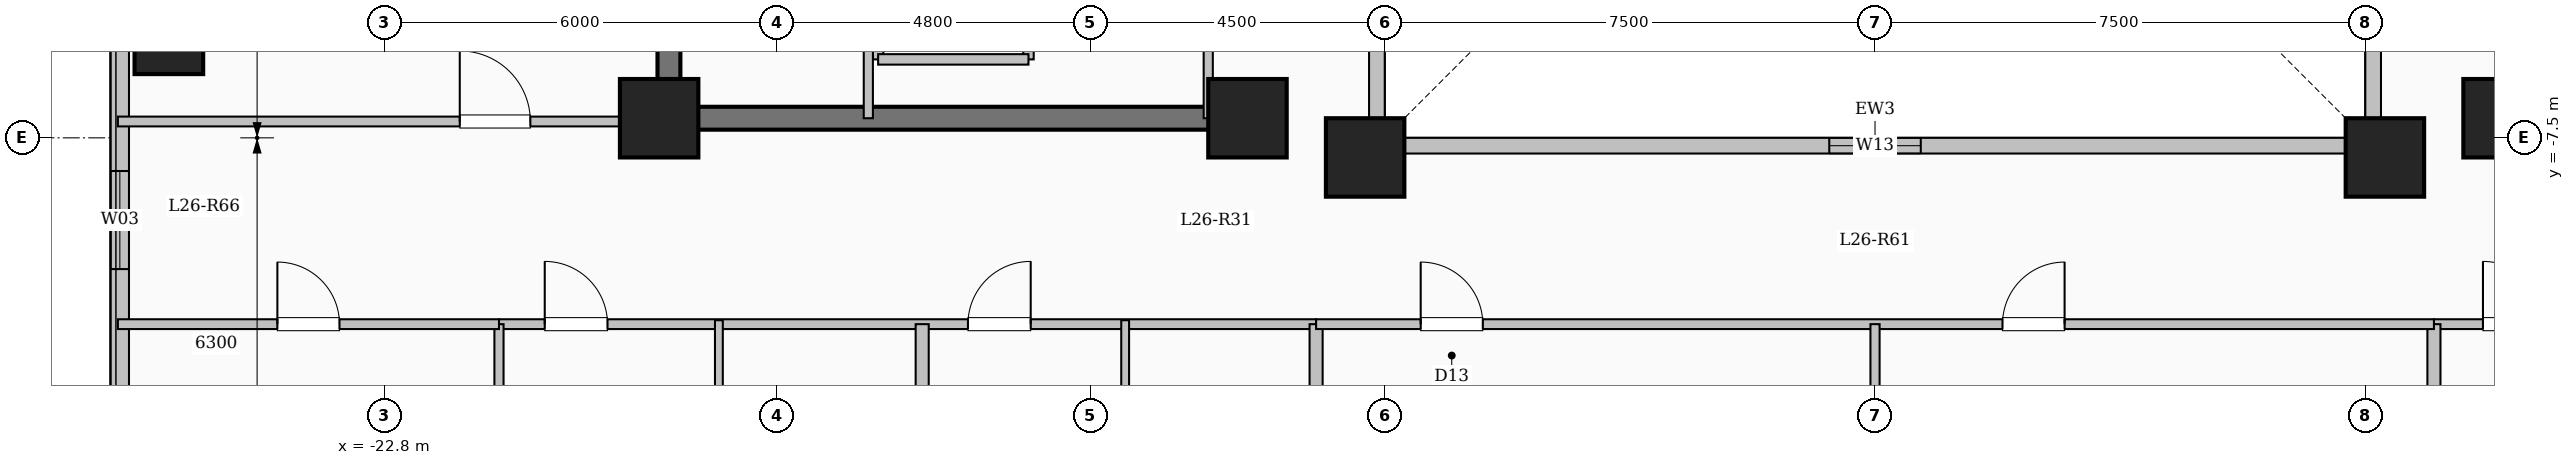
"""IFC4 building model, lengths in metres.
Left out: names, types, materials, properties, quantities, classifications, styles, units other than length and angle.
Written with IfcOpenShell. Run it as: python <this file> out.ifc"""

import sys

from ifc_helpers import new_model, si_unit, direction, frame, frame_2d, origin, origin_2d, place, context, subcontext, project, spatial, rectangle, extrude, element, fill, save


model = new_model("IFC4")
c1 = context("Model", 3, precision=1e-05, world=origin(), true_north=direction((0.0, 1.0)))
c2 = subcontext(c1, "Body", "Model", "MODEL_VIEW")
j1 = project(units=[si_unit("LENGTHUNIT", "METRE"), si_unit("PLANEANGLEUNIT", "RADIAN")], contexts=[c1])
p1 = place(None, origin())
s1 = spatial("IfcSite", under=j1, at=p1, CompositionType="ELEMENT")
p2 = place(p1, origin())
s2 = spatial("IfcBuilding", under=s1, at=p2, CompositionType="ELEMENT")
p3 = place(p2, frame((0.0, 0.0, 98.4)))
s3 = spatial("IfcBuildingStorey", under=s2, at=p3, CompositionType="ELEMENT", Elevation=98.4)
for number, where, z_axis, x_axis in (
    (1, (-7.8, -7.8, 0.0), (0.0, 0.0, 1.0), (1.0, 0.0, 0.0)),
    (2, (7.8, -7.8, 0.0), (0.0, 0.0, 1.0), (1.0, 0.0, 0.0)),
    (3, (-9.6, -7.2, 0.0), (0.0, 0.0, 1.0), (1.0, 0.0, 0.0)),
    (4, (9.6, -7.2, 0.0), (0.0, 0.0, 1.0), (1.0, 0.0, 0.0)),
    (5, (-18.6, -7.2, 0.0), (0.0, 0.0, 1.0), (1.0, 0.0, 0.0)),
):
    element("IfcColumn", number, at=place(p3, frame(where, z_axis=z_axis, x_axis=x_axis)), inside=s3, PredefinedType="COLUMN", context=c2, shape_type="SweptSolid", body=[
        extrude(rectangle(XDim=1.2, YDim=1.2, at=origin_2d()), origin(), (0.0, 0.0, 1.0), 3.35),
    ])
p4 = place(p3, frame((-26.1, -6.0, 0.0), z_axis=(0.0, 0.0, 1.0), x_axis=(1.0, 0.0, 0.0)))
e6 = element("IfcColumn", 6, at=p4, inside=s3, PredefinedType="COLUMN", context=c2, shape_type="SweptSolid", body=[
    extrude(rectangle(XDim=1.05, YDim=1.05, at=origin_2d()), origin(), (0.0, 0.0, 1.0), 3.35),
])
p5 = place(p3, frame((-7.62, -7.62, 0.0), z_axis=(0.0, 0.0, 1.0), x_axis=(1.0, 0.0, 0.0)))
e7 = element("IfcWall", 7, at=p5, inside=s3, PredefinedType="SOLIDWALL", context=c2, shape_type="SweptSolid", body=[
    extrude(rectangle(XDim=15.24, YDim=0.24, at=frame_2d((7.62, 0.0))), origin(), (0.0, 0.0, 1.0), 3.1),
])
p6 = place(p5, frame((6.92, 0.0, 0.95)))
e8 = element("IfcOpeningElement", 8, at=p6, cuts=e7, PredefinedType="OPENING", context=c2, shape_type="SweptSolid", body=[
    extrude(rectangle(XDim=1.4, YDim=1.5, at=frame_2d((0.7, 0.75))), frame((0.0, 0.13, 0.0), z_axis=(0.0, -1.0, 0.0), x_axis=(1.0, 0.0, 0.0)), (0.0, 0.0, 1.0), 0.26),
])
p7 = place(p3, frame((7.62, -7.62, 0.0), z_axis=(0.0, 0.0, 1.0), x_axis=(0.0, 1.0, 0.0)))
e9 = element("IfcWall", 9, at=p7, inside=s3, PredefinedType="SOLIDWALL", context=c2, shape_type="SweptSolid", body=[
    extrude(rectangle(XDim=15.24, YDim=0.24, at=frame_2d((7.62, 0.0))), origin(), (0.0, 0.0, 1.0), 3.1),
])
p8 = place(p7, frame((6.92, 0.0, 0.95)))
e10 = element("IfcOpeningElement", 10, at=p8, cuts=e9, PredefinedType="OPENING", context=c2, shape_type="SweptSolid", body=[
    extrude(rectangle(XDim=1.4, YDim=1.5, at=frame_2d((0.7, 0.75))), frame((0.0, 0.13, 0.0), z_axis=(0.0, -1.0, 0.0), x_axis=(1.0, 0.0, 0.0)), (0.0, 0.0, 1.0), 0.26),
])
p9 = place(p3, frame((-7.62, 7.62, 0.0), z_axis=(0.0, 0.0, 1.0), x_axis=(0.0, -1.0, 0.0)))
e11 = element("IfcWall", 11, at=p9, inside=s3, PredefinedType="SOLIDWALL", context=c2, shape_type="SweptSolid", body=[
    extrude(rectangle(XDim=15.24, YDim=0.24, at=frame_2d((7.62, 0.0))), origin(), (0.0, 0.0, 1.0), 3.1),
])
p10 = place(p9, frame((6.92, 0.0, 0.95)))
e12 = element("IfcOpeningElement", 12, at=p10, cuts=e11, PredefinedType="OPENING", context=c2, shape_type="SweptSolid", body=[
    extrude(rectangle(XDim=1.4, YDim=1.5, at=frame_2d((0.7, 0.75))), frame((0.0, 0.13, 0.0), z_axis=(0.0, -1.0, 0.0), x_axis=(1.0, 0.0, 0.0)), (0.0, 0.0, 1.0), 0.26),
])
p11 = place(p3, frame((-26.85, -17.85, 0.0), z_axis=(0.0, 0.0, 1.0), x_axis=(0.0, 1.0, 0.0)))
e13 = element("IfcWall", 13, at=p11, inside=s3, PredefinedType="SOLIDWALL", context=c2, shape_type="SweptSolid", body=[
    extrude(rectangle(XDim=35.7, YDim=0.28, at=frame_2d((17.85, 0.0))), origin(), (0.0, 0.0, 1.0), 3.1),
])
p12 = place(p11, frame((2.55, 0.0, 0.9)))
e14 = element("IfcOpeningElement", 14, at=p12, cuts=e13, PredefinedType="OPENING", context=c2, shape_type="SweptSolid", body=[
    extrude(rectangle(XDim=2.4, YDim=1.8, at=frame_2d((1.2, 0.9))), frame((0.0, 0.15, 0.0), z_axis=(0.0, -1.0, 0.0), x_axis=(1.0, 0.0, 0.0)), (0.0, 0.0, 1.0), 0.3),
])
p13 = place(p11, frame((8.343, 0.0, 0.9)))
e15 = element("IfcOpeningElement", 15, at=p13, cuts=e13, PredefinedType="OPENING", context=c2, shape_type="SweptSolid", body=[
    extrude(rectangle(XDim=1.5, YDim=1.65, at=frame_2d((0.75, 0.825))), frame((0.0, 0.15, 0.0), z_axis=(0.0, -1.0, 0.0), x_axis=(1.0, 0.0, 0.0)), (0.0, 0.0, 1.0), 0.3),
])
p14 = place(p11, frame((18.6, 0.0, 0.9)))
e16 = element("IfcOpeningElement", 16, at=p14, cuts=e13, PredefinedType="OPENING", context=c2, shape_type="SweptSolid", body=[
    extrude(rectangle(XDim=2.0, YDim=1.7, at=frame_2d((1.0, 0.85))), frame((0.0, 0.15, 0.0), z_axis=(0.0, -1.0, 0.0), x_axis=(1.0, 0.0, 0.0)), (0.0, 0.0, 1.0), 0.3),
])
p15 = place(p11, frame((28.975, 0.0, 0.95)))
e17 = element("IfcOpeningElement", 17, at=p15, cuts=e13, PredefinedType="OPENING", context=c2, shape_type="SweptSolid", body=[
    extrude(rectangle(XDim=1.0, YDim=1.5, at=frame_2d((0.5, 0.75))), frame((0.0, 0.15, 0.0), z_axis=(0.0, -1.0, 0.0), x_axis=(1.0, 0.0, 0.0)), (0.0, 0.0, 1.0), 0.3),
])
p16 = place(p11, frame((32.025, 0.0, 0.9)))
e18 = element("IfcOpeningElement", 18, at=p16, cuts=e13, PredefinedType="OPENING", context=c2, shape_type="SweptSolid", body=[
    extrude(rectangle(XDim=2.0, YDim=1.7, at=frame_2d((1.0, 0.85))), frame((0.0, 0.15, 0.0), z_axis=(0.0, -1.0, 0.0), x_axis=(1.0, 0.0, 0.0)), (0.0, 0.0, 1.0), 0.3),
])
for number, where, z_axis, x_axis in (
    (19, (-15.25, -6.3, 0.0), (0.0, 0.0, 1.0), (0.0, 1.0, 0.0)),
    (20, (-12.95, -6.3, 0.0), (0.0, 0.0, 1.0), (0.0, 1.0, 0.0)),
):
    element("IfcWall", number, at=place(p3, frame(where, z_axis=z_axis, x_axis=x_axis)), inside=s3, PredefinedType="SOLIDWALL", context=c2, shape_type="SweptSolid", body=[
        extrude(rectangle(XDim=2.6, YDim=0.16, at=frame_2d((1.3, 0.0))), origin(), (0.0, 0.0, 1.0), 3.1),
    ])
p17 = place(p3, frame((-15.25, -6.3, 0.0), z_axis=(0.0, 0.0, 1.0), x_axis=(1.0, 0.0, 0.0)))
e21 = element("IfcWall", 21, at=p17, inside=s3, PredefinedType="SOLIDWALL", context=c2, shape_type="SweptSolid", body=[
    extrude(rectangle(XDim=2.3, YDim=0.16, at=frame_2d((1.15, 0.0))), origin(), (0.0, 0.0, 1.0), 3.1),
])
p18 = place(p3, frame((-18.45, -7.375, 0.0), z_axis=(0.0, 0.0, 1.0), x_axis=(0.0, 1.0, 0.0)))
e22 = element("IfcWall", 22, at=p18, inside=s3, PredefinedType="SHEAR", context=c2, shape_type="SweptSolid", body=[
    extrude(rectangle(XDim=14.05, YDim=0.35, at=frame_2d((7.025, 0.0))), origin(), (0.0, 0.0, 1.0), 3.35),
])
p19 = place(p3, frame((-18.625, -7.2, 0.0), z_axis=(0.0, 0.0, 1.0), x_axis=(1.0, 0.0, 0.0)))
e23 = element("IfcWall", 23, at=p19, inside=s3, PredefinedType="SHEAR", context=c2, shape_type="SweptSolid", body=[
    extrude(rectangle(XDim=8.55, YDim=0.35, at=frame_2d((4.275, 0.0))), origin(), (0.0, 0.0, 1.0), 3.35),
])
p20 = place(p3, frame((-15.4, -7.2, 0.0), z_axis=(0.0, 0.0, 1.0), x_axis=(0.0, 1.0, 0.0)))
e24 = element("IfcWall", 24, at=p20, inside=s3, PredefinedType="PARTITIONING", context=c2, shape_type="SweptSolid", body=[
    extrude(rectangle(XDim=10.45, YDim=0.14, at=frame_2d((5.225, 0.0))), origin(), (0.0, 0.0, 1.0), 3.1),
])
p21 = place(p20, frame((9.25, 0.0, 0.0)))
e25 = element("IfcOpeningElement", 25, at=p21, cuts=e24, PredefinedType="OPENING", context=c2, shape_type="SweptSolid", body=[
    extrude(rectangle(XDim=0.9, YDim=2.08, at=frame_2d((0.45, 1.04))), frame((0.0, 0.08, 0.0), z_axis=(0.0, -1.0, 0.0), x_axis=(1.0, 0.0, 0.0)), (0.0, 0.0, 1.0), 0.16),
])
p22 = place(p3, frame((-10.2, -7.2, 0.0), z_axis=(0.0, 0.0, 1.0), x_axis=(0.0, 1.0, 0.0)))
e26 = element("IfcWall", 26, at=p22, inside=s3, PredefinedType="PARTITIONING", context=c2, shape_type="SweptSolid", body=[
    extrude(rectangle(XDim=9.12, YDim=0.14, at=frame_2d((4.56, 0.0))), origin(), (0.0, 0.0, 1.0), 3.1),
])
p23 = place(p22, frame((1.9, 0.0, 0.0)))
e27 = element("IfcOpeningElement", 27, at=p23, cuts=e26, PredefinedType="OPENING", context=c2, shape_type="SweptSolid", body=[
    extrude(rectangle(XDim=0.95, YDim=2.12, at=frame_2d((0.475, 1.06))), frame((0.0, 0.08, 0.0), z_axis=(0.0, -1.0, 0.0), x_axis=(1.0, 0.0, 0.0)), (0.0, 0.0, 1.0), 0.16),
])
p24 = place(p22, frame((6.6, 0.0, 0.0)))
e28 = element("IfcOpeningElement", 28, at=p24, cuts=e26, PredefinedType="OPENING", context=c2, shape_type="SweptSolid", body=[
    extrude(rectangle(XDim=0.95, YDim=2.12, at=frame_2d((0.475, 1.06))), frame((0.0, 0.08, 0.0), z_axis=(0.0, -1.0, 0.0), x_axis=(1.0, 0.0, 0.0)), (0.0, 0.0, 1.0), 0.16),
])
p25 = place(p3, frame((-21.05, -10.35, 0.0), z_axis=(0.0, 0.0, 1.0), x_axis=(1.0, 0.0, 0.0)))
e29 = element("IfcWall", 29, at=p25, inside=s3, PredefinedType="PARTITIONING", context=c2, shape_type="SweptSolid", body=[
    extrude(rectangle(XDim=12.5, YDim=0.15, at=frame_2d((6.25, 0.0))), origin(), (0.0, 0.0, 1.0), 3.1),
])
p26 = place(p25, frame((0.7, 0.0, 0.0)))
e30 = element("IfcOpeningElement", 30, at=p26, cuts=e29, PredefinedType="OPENING", context=c2, shape_type="SweptSolid", body=[
    extrude(rectangle(XDim=0.96, YDim=2.15, at=frame_2d((0.48, 1.075))), frame((0.0, 0.085, 0.0), z_axis=(0.0, -1.0, 0.0), x_axis=(1.0, 0.0, 0.0)), (0.0, 0.0, 1.0), 0.17),
])
p27 = place(p25, frame((7.174, 0.0, 0.0)))
e31 = element("IfcOpeningElement", 31, at=p27, cuts=e29, PredefinedType="OPENING", context=c2, shape_type="SweptSolid", body=[
    extrude(rectangle(XDim=0.96, YDim=2.15, at=frame_2d((0.48, 1.075))), frame((0.0, 0.085, 0.0), z_axis=(0.0, -1.0, 0.0), x_axis=(1.0, 0.0, 0.0)), (0.0, 0.0, 1.0), 0.17),
])
p28 = place(p3, frame((8.55, -10.35, 0.0), z_axis=(0.0, 0.0, 1.0), x_axis=(1.0, 0.0, 0.0)))
e32 = element("IfcWall", 32, at=p28, inside=s3, PredefinedType="PARTITIONING", context=c2, shape_type="SweptSolid", body=[
    extrude(rectangle(XDim=12.5, YDim=0.15, at=frame_2d((6.25, 0.0))), origin(), (0.0, 0.0, 1.0), 3.1),
])
p29 = place(p28, frame((0.75, 0.0, 0.0)))
e33 = element("IfcOpeningElement", 33, at=p29, cuts=e32, PredefinedType="OPENING", context=c2, shape_type="SweptSolid", body=[
    extrude(rectangle(XDim=0.96, YDim=2.15, at=frame_2d((0.48, 1.075))), frame((0.0, 0.085, 0.0), z_axis=(0.0, -1.0, 0.0), x_axis=(1.0, 0.0, 0.0)), (0.0, 0.0, 1.0), 0.17),
])
p30 = place(p28, frame((6.975, 0.0, 0.0)))
e34 = element("IfcOpeningElement", 34, at=p30, cuts=e32, PredefinedType="OPENING", context=c2, shape_type="SweptSolid", body=[
    extrude(rectangle(XDim=0.96, YDim=2.15, at=frame_2d((0.48, 1.075))), frame((0.0, 0.085, 0.0), z_axis=(0.0, -1.0, 0.0), x_axis=(1.0, 0.0, 0.0)), (0.0, 0.0, 1.0), 0.17),
])
p31 = place(p3, frame((-14.576, -22.1, 0.0), z_axis=(0.0, 0.0, 1.0), x_axis=(0.0, 1.0, 0.0)))
e35 = element("IfcWall", 35, at=p31, inside=s3, PredefinedType="SOLIDWALL", context=c2, shape_type="SweptSolid", body=[
    extrude(rectangle(XDim=11.75, YDim=0.2, at=frame_2d((5.875, 0.0))), origin(), (0.0, 0.0, 1.0), 3.1),
])
p32 = place(p3, frame((-17.686, -13.51, 0.0), z_axis=(0.0, 0.0, 1.0), x_axis=(0.0, 1.0, 0.0)))
e36 = element("IfcWall", 36, at=p32, inside=s3, PredefinedType="PARTITIONING", context=c2, shape_type="SweptSolid", body=[
    extrude(rectangle(XDim=3.22, YDim=0.12, at=frame_2d((1.61, 0.0))), origin(), (0.0, 0.0, 1.0), 3.1),
])
p33 = place(p32, frame((1.14, 0.0, 0.0)))
e37 = element("IfcOpeningElement", 37, at=p33, cuts=e36, PredefinedType="OPENING", context=c2, shape_type="SweptSolid", body=[
    extrude(rectangle(XDim=0.88, YDim=2.1, at=frame_2d((0.44, 1.05))), frame((0.0, 0.07, 0.0), z_axis=(0.0, -1.0, 0.0), x_axis=(1.0, 0.0, 0.0)), (0.0, 0.0, 1.0), 0.14),
])
p34 = place(p3, frame((-11.471, -13.51, 0.0), z_axis=(0.0, 0.0, 1.0), x_axis=(0.0, 1.0, 0.0)))
e38 = element("IfcWall", 38, at=p34, inside=s3, PredefinedType="PARTITIONING", context=c2, shape_type="SweptSolid", body=[
    extrude(rectangle(XDim=3.22, YDim=0.12, at=frame_2d((1.61, 0.0))), origin(), (0.0, 0.0, 1.0), 3.1),
])
p35 = place(p34, frame((1.14, 0.0, 0.0)))
e39 = element("IfcOpeningElement", 39, at=p35, cuts=e38, PredefinedType="OPENING", context=c2, shape_type="SweptSolid", body=[
    extrude(rectangle(XDim=0.88, YDim=2.1, at=frame_2d((0.44, 1.05))), frame((0.0, 0.07, 0.0), z_axis=(0.0, -1.0, 0.0), x_axis=(1.0, 0.0, 0.0)), (0.0, 0.0, 1.0), 0.14),
])
for number, where, z_axis, x_axis in (
    (40, (-8.55, -22.704, 0.0), (0.0, 0.0, 1.0), (0.0, 1.0, 0.0)),
    (41, (8.55, -22.704, 0.0), (0.0, 0.0, 1.0), (0.0, 1.0, 0.0)),
):
    element("IfcWall", number, at=place(p3, frame(where, z_axis=z_axis, x_axis=x_axis)), inside=s3, PredefinedType="SOLIDWALL", context=c2, shape_type="SweptSolid", body=[
        extrude(rectangle(XDim=12.354, YDim=0.2, at=frame_2d((6.177, 0.0))), origin(), (0.0, 0.0, 1.0), 3.1),
    ])
p36 = place(p3, frame((-8.55, -10.35, 0.0), z_axis=(0.0, 0.0, 1.0), x_axis=(1.0, 0.0, 0.0)))
e42 = element("IfcWall", 42, at=p36, inside=s3, PredefinedType="PARTITIONING", context=c2, shape_type="SweptSolid", body=[
    extrude(rectangle(XDim=17.1, YDim=0.15, at=frame_2d((8.55, 0.0))), origin(), (0.0, 0.0, 1.0), 3.1),
])
p37 = place(p36, frame((1.6, 0.0, 0.0)))
e43 = element("IfcOpeningElement", 43, at=p37, cuts=e42, PredefinedType="OPENING", context=c2, shape_type="SweptSolid", body=[
    extrude(rectangle(XDim=0.95, YDim=2.15, at=frame_2d((0.475, 1.075))), frame((0.0, 0.085, 0.0), z_axis=(0.0, -1.0, 0.0), x_axis=(1.0, 0.0, 0.0)), (0.0, 0.0, 1.0), 0.17),
])
p38 = place(p36, frame((10.5, 0.0, 0.0)))
e44 = element("IfcOpeningElement", 44, at=p38, cuts=e42, PredefinedType="OPENING", context=c2, shape_type="SweptSolid", body=[
    extrude(rectangle(XDim=0.95, YDim=2.15, at=frame_2d((0.475, 1.075))), frame((0.0, 0.085, 0.0), z_axis=(0.0, -1.0, 0.0), x_axis=(1.0, 0.0, 0.0)), (0.0, 0.0, 1.0), 0.17),
])
p39 = place(p3, frame((0.0, -23.58, 0.0), z_axis=(0.0, 0.0, 1.0), x_axis=(0.0, 1.0, 0.0)))
e45 = element("IfcWall", 45, at=p39, inside=s3, PredefinedType="PARTITIONING", context=c2, shape_type="SweptSolid", body=[
    extrude(rectangle(XDim=13.23, YDim=0.14, at=frame_2d((6.615, 0.0))), origin(), (0.0, 0.0, 1.0), 3.1),
])
p40 = place(p3, frame((-26.88, -7.25, 0.0), z_axis=(0.0, 0.0, 1.0), x_axis=(1.0, 0.0, 0.0)))
e46 = element("IfcWall", 46, at=p40, inside=s3, PredefinedType="PARTITIONING", context=c2, shape_type="SweptSolid", body=[
    extrude(rectangle(XDim=8.43, YDim=0.15, at=frame_2d((4.215, 0.0))), origin(), (0.0, 0.0, 1.0), 3.1),
])
p41 = place(p40, frame((5.23, 0.0, 0.0)))
e47 = element("IfcOpeningElement", 47, at=p41, cuts=e46, PredefinedType="OPENING", context=c2, shape_type="SweptSolid", body=[
    extrude(rectangle(XDim=1.08, YDim=2.15, at=frame_2d((0.54, 1.075))), frame((0.0, 0.085, 0.0), z_axis=(0.0, -1.0, 0.0), x_axis=(1.0, 0.0, 0.0)), (0.0, 0.0, 1.0), 0.17),
])
p42 = place(p3, frame((-21.05, -17.85, 0.0), z_axis=(0.0, 0.0, 1.0), x_axis=(0.0, 1.0, 0.0)))
e48 = element("IfcWall", 48, at=p42, inside=s3, PredefinedType="PARTITIONING", context=c2, shape_type="SweptSolid", body=[
    extrude(rectangle(XDim=7.5, YDim=0.14, at=frame_2d((3.75, 0.0))), origin(), (0.0, 0.0, 1.0), 3.1),
])
p43 = place(p3, frame((-26.88, -10.35, 0.0), z_axis=(0.0, 0.0, 1.0), x_axis=(1.0, 0.0, 0.0)))
e49 = element("IfcWall", 49, at=p43, inside=s3, PredefinedType="PARTITIONING", context=c2, shape_type="SweptSolid", body=[
    extrude(rectangle(XDim=5.83, YDim=0.15, at=frame_2d((2.915, 0.0))), origin(), (0.0, 0.0, 1.0), 3.1),
])
p44 = place(p43, frame((2.44, 0.0, 0.0)))
e50 = element("IfcOpeningElement", 50, at=p44, cuts=e49, PredefinedType="OPENING", context=c2, shape_type="SweptSolid", body=[
    extrude(rectangle(XDim=0.95, YDim=2.15, at=frame_2d((0.475, 1.075))), frame((0.0, 0.085, 0.0), z_axis=(0.0, -1.0, 0.0), x_axis=(1.0, 0.0, 0.0)), (0.0, 0.0, 1.0), 0.17),
])
p45 = place(p6, origin())
e51 = element("IfcWindow", 51, at=p45, inside=s3, PartitioningType="SINGLE_PANEL", PredefinedType="WINDOW", context=c2, shape_type="SweptSolid", body=[
    extrude(rectangle(XDim=1.4, YDim=1.5, at=frame_2d((0.7, 0.75))), frame((0.0, 0.03, 0.0), z_axis=(0.0, -1.0, 0.0), x_axis=(1.0, 0.0, 0.0)), (0.0, 0.0, 1.0), 0.06),
])
fill(e8, e51)
p46 = place(p13, origin())
e52 = element("IfcWindow", 52, at=p46, inside=s3, PartitioningType="SINGLE_PANEL", PredefinedType="WINDOW", context=c2, shape_type="SweptSolid", body=[
    extrude(rectangle(XDim=1.5, YDim=1.65, at=frame_2d((0.75, 0.825))), frame((0.0, 0.03, 0.0), z_axis=(0.0, -1.0, 0.0), x_axis=(1.0, 0.0, 0.0)), (0.0, 0.0, 1.0), 0.06),
])
fill(e15, e52)
p47 = place(p26, origin())
e53 = element("IfcDoor", 53, at=p47, inside=s3, OperationType="SINGLE_SWING_LEFT", PredefinedType="DOOR", context=c2, shape_type="SweptSolid", body=[
    extrude(rectangle(XDim=0.96, YDim=2.15, at=frame_2d((0.48, 1.075))), frame((0.0, 0.025, 0.0), z_axis=(0.0, -1.0, 0.0), x_axis=(1.0, 0.0, 0.0)), (0.0, 0.0, 1.0), 0.05),
])
fill(e30, e53)
p48 = place(p27, origin())
e54 = element("IfcDoor", 54, at=p48, inside=s3, OperationType="SINGLE_SWING_RIGHT", PredefinedType="DOOR", context=c2, shape_type="SweptSolid", body=[
    extrude(rectangle(XDim=0.96, YDim=2.15, at=frame_2d((0.48, 1.075))), frame((0.0, 0.025, 0.0), z_axis=(0.0, -1.0, 0.0), x_axis=(1.0, 0.0, 0.0)), (0.0, 0.0, 1.0), 0.05),
])
fill(e31, e54)
p49 = place(p29, origin())
e55 = element("IfcDoor", 55, at=p49, inside=s3, OperationType="SINGLE_SWING_LEFT", PredefinedType="DOOR", context=c2, shape_type="SweptSolid", body=[
    extrude(rectangle(XDim=0.96, YDim=2.15, at=frame_2d((0.48, 1.075))), frame((0.0, 0.025, 0.0), z_axis=(0.0, -1.0, 0.0), x_axis=(1.0, 0.0, 0.0)), (0.0, 0.0, 1.0), 0.05),
])
fill(e33, e55)
p50 = place(p37, origin())
e56 = element("IfcDoor", 56, at=p50, inside=s3, OperationType="SINGLE_SWING_LEFT", PredefinedType="DOOR", context=c2, shape_type="SweptSolid", body=[
    extrude(rectangle(XDim=0.95, YDim=2.15, at=frame_2d((0.475, 1.075))), frame((0.0, 0.025, 0.0), z_axis=(0.0, -1.0, 0.0), x_axis=(1.0, 0.0, 0.0)), (0.0, 0.0, 1.0), 0.05),
])
fill(e43, e56)
p51 = place(p38, origin())
e57 = element("IfcDoor", 57, at=p51, inside=s3, OperationType="SINGLE_SWING_RIGHT", PredefinedType="DOOR", context=c2, shape_type="SweptSolid", body=[
    extrude(rectangle(XDim=0.95, YDim=2.15, at=frame_2d((0.475, 1.075))), frame((0.0, 0.025, 0.0), z_axis=(0.0, -1.0, 0.0), x_axis=(1.0, 0.0, 0.0)), (0.0, 0.0, 1.0), 0.05),
])
fill(e44, e57)
p52 = place(p44, origin())
e58 = element("IfcDoor", 58, at=p52, inside=s3, OperationType="SINGLE_SWING_LEFT", PredefinedType="DOOR", context=c2, shape_type="SweptSolid", body=[
    extrude(rectangle(XDim=0.95, YDim=2.15, at=frame_2d((0.475, 1.075))), frame((0.0, 0.025, 0.0), z_axis=(0.0, -1.0, 0.0), x_axis=(1.0, 0.0, 0.0)), (0.0, 0.0, 1.0), 0.05),
])
fill(e50, e58)
p53 = place(p41, origin())
e59 = element("IfcDoor", 59, at=p53, inside=s3, OperationType="SINGLE_SWING_LEFT", PredefinedType="DOOR", context=c2, shape_type="SweptSolid", body=[
    extrude(rectangle(XDim=1.08, YDim=2.15, at=frame_2d((0.54, 1.075))), frame((0.0, 0.025, 0.0), z_axis=(0.0, -1.0, 0.0), x_axis=(1.0, 0.0, 0.0)), (0.0, 0.0, 1.0), 0.05),
])
fill(e47, e59)
save(model, sys.argv[1])
